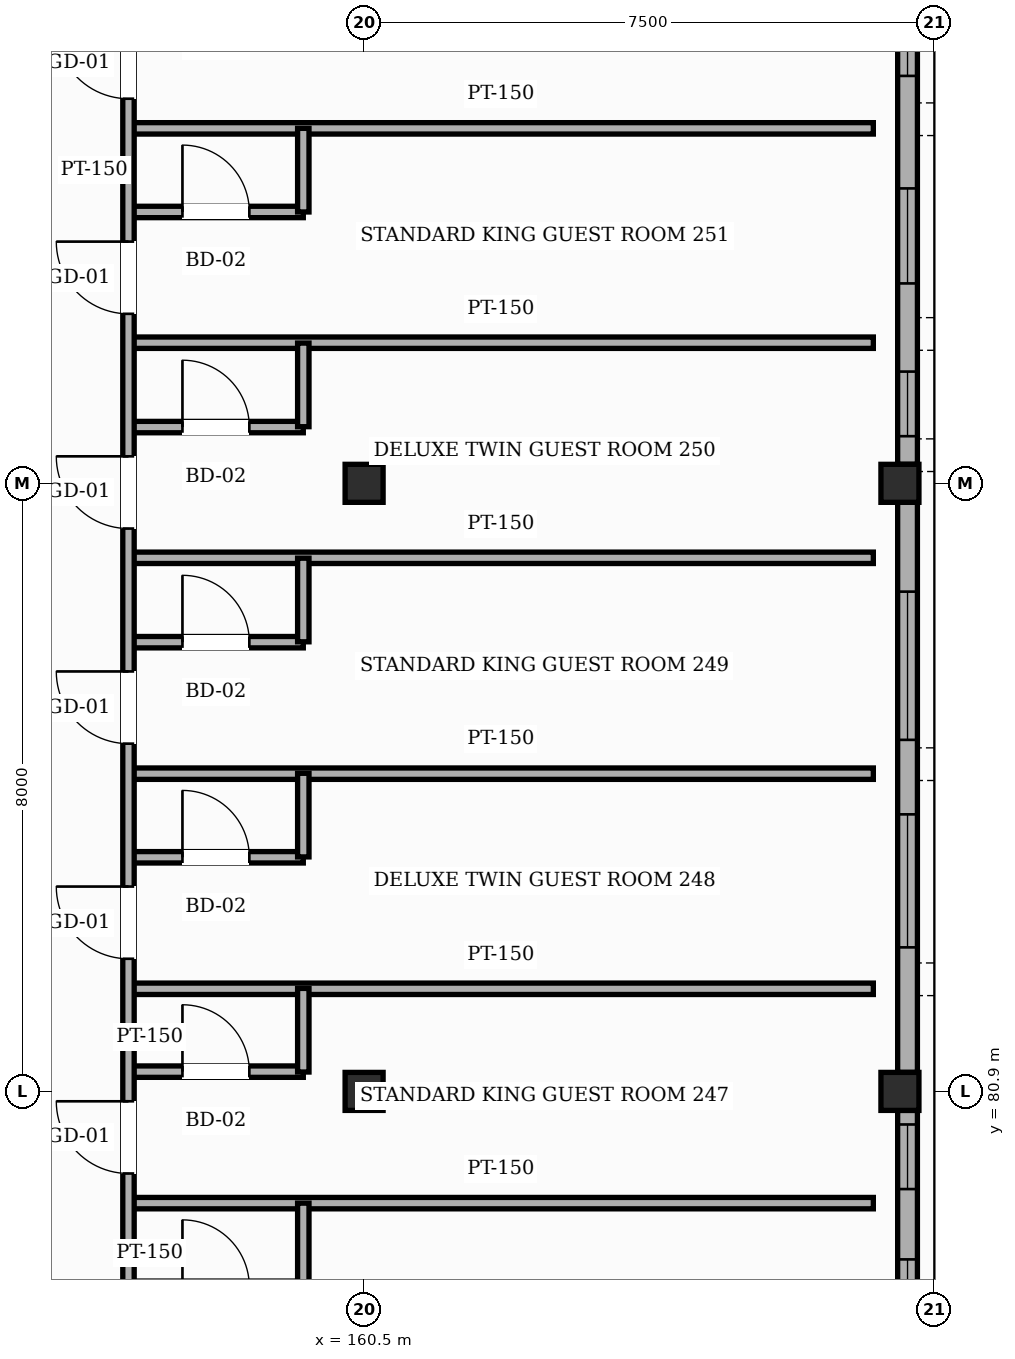
"""IFC4 building model, lengths in metres.
Left out: names, types, materials, properties, quantities, classifications, styles, units other than length and angle.
Written with IfcOpenShell. Run it as: python <this file> out.ifc"""

import sys

from ifc_helpers import new_model, si_unit, direction, frame, frame_2d, origin, origin_2d, place, context, subcontext, project, spatial, rectangle, hollow_rectangle, extrude, element, fill, save


model = new_model("IFC4")
c1 = context("Model", 3, precision=1e-05, world=origin(), true_north=direction((0.0, 1.0)))
c2 = subcontext(c1, "Body", "Model", "MODEL_VIEW")
j1 = project(units=[si_unit("LENGTHUNIT", "METRE"), si_unit("PLANEANGLEUNIT", "RADIAN")], contexts=[c1])
p1 = place(None, origin())
s1 = spatial("IfcSite", under=j1, at=p1, CompositionType="ELEMENT")
p2 = place(p1, origin())
s2 = spatial("IfcBuilding", under=s1, at=p2, CompositionType="ELEMENT")
p3 = place(p2, frame((0.0, 0.0, 35.4)))
s3 = spatial("IfcBuildingStorey", under=s2, at=p3, CompositionType="ELEMENT", Elevation=35.4)
for number, where, z_axis, x_axis in (
    (1, (160.5, 80.9, 0.0), (0.0, 0.0, 1.0), (1.0, 0.0, 0.0)),
    (2, (160.5, 88.9, 0.0), (0.0, 0.0, 1.0), (1.0, 0.0, 0.0)),
    (3, (167.55, 80.9, 0.0), (0.0, 0.0, 1.0), (1.0, 0.0, 0.0)),
    (4, (167.55, 88.9, 0.0), (0.0, 0.0, 1.0), (1.0, 0.0, 0.0)),
):
    element("IfcColumn", number, at=place(p3, frame(where, z_axis=z_axis, x_axis=x_axis)), inside=s3, PredefinedType="COLUMN", context=c2, shape_type="SweptSolid", body=[
        extrude(hollow_rectangle(XDim=0.5, YDim=0.5, WallThickness=0.022, InnerFilletRadius=0.022, OuterFilletRadius=0.044, at=origin_2d()), origin(), (0.0, 0.0, 1.0), 3.6),
    ])
p4 = place(p3, frame((167.65, 80.65, 0.0), z_axis=(0.0, 0.0, 1.0), x_axis=(0.0, -1.0, 0.0)))
e5 = element("IfcWall", 5, at=p4, inside=s3, PredefinedType="SOLIDWALL", context=c2, shape_type="SweptSolid", body=[
    extrude(rectangle(XDim=4.225, YDim=0.26, at=frame_2d((2.112, 0.0))), origin(), (0.0, 0.0, 1.0), 3.365),
])
p5 = place(p4, frame((1.96, 0.0, 0.85)))
e6 = element("IfcOpeningElement", 6, at=p5, cuts=e5, PredefinedType="OPENING", context=c2, shape_type="SweptSolid", body=[
    extrude(rectangle(XDim=1.35, YDim=1.35, at=frame_2d((0.675, 0.675))), frame((0.0, 0.14, 0.0), z_axis=(0.0, -1.0, 0.0), x_axis=(1.0, 0.0, 0.0)), (0.0, 0.0, 1.0), 0.28),
])
p6 = place(p4, frame((0.185, 0.0, 0.85)))
e7 = element("IfcOpeningElement", 7, at=p6, cuts=e5, PredefinedType="OPENING", context=c2, shape_type="SweptSolid", body=[
    extrude(rectangle(XDim=0.85, YDim=1.35, at=frame_2d((0.425, 0.675))), frame((0.0, 0.14, 0.0), z_axis=(0.0, -1.0, 0.0), x_axis=(1.0, 0.0, 0.0)), (0.0, 0.0, 1.0), 0.28),
])
p7 = place(p3, frame((167.65, 88.65, 0.0), z_axis=(0.0, 0.0, 1.0), x_axis=(0.0, -1.0, 0.0)))
e8 = element("IfcWall", 8, at=p7, inside=s3, PredefinedType="SOLIDWALL", context=c2, shape_type="SweptSolid", body=[
    extrude(rectangle(XDim=7.5, YDim=0.26, at=frame_2d((3.75, 0.0))), origin(), (0.0, 0.0, 1.0), 2.755),
])
p8 = place(p7, frame((4.105, 0.0, 0.85)))
e9 = element("IfcOpeningElement", 9, at=p8, cuts=e8, PredefinedType="OPENING", context=c2, shape_type="SweptSolid", body=[
    extrude(rectangle(XDim=1.75, YDim=1.35, at=frame_2d((0.875, 0.675))), frame((0.0, 0.14, 0.0), z_axis=(0.0, -1.0, 0.0), x_axis=(1.0, 0.0, 0.0)), (0.0, 0.0, 1.0), 0.28),
])
p9 = place(p7, frame((1.175, 0.0, 0.85)))
e10 = element("IfcOpeningElement", 10, at=p9, cuts=e8, PredefinedType="OPENING", context=c2, shape_type="SweptSolid", body=[
    extrude(rectangle(XDim=1.95, YDim=1.35, at=frame_2d((0.975, 0.675))), frame((0.0, 0.14, 0.0), z_axis=(0.0, -1.0, 0.0), x_axis=(1.0, 0.0, 0.0)), (0.0, 0.0, 1.0), 0.28),
])
p10 = place(p3, frame((167.65, 96.65, 0.0), z_axis=(0.0, 0.0, 1.0), x_axis=(0.0, -1.0, 0.0)))
e11 = element("IfcWall", 11, at=p10, inside=s3, PredefinedType="SOLIDWALL", context=c2, shape_type="SweptSolid", body=[
    extrude(rectangle(XDim=7.5, YDim=0.26, at=frame_2d((3.75, 0.0))), origin(), (0.0, 0.0, 1.0), 2.755),
])
p11 = place(p10, frame((6.28, 0.0, 0.85)))
e12 = element("IfcOpeningElement", 12, at=p11, cuts=e11, PredefinedType="OPENING", context=c2, shape_type="SweptSolid", body=[
    extrude(rectangle(XDim=0.85, YDim=1.35, at=frame_2d((0.425, 0.675))), frame((0.0, 0.14, 0.0), z_axis=(0.0, -1.0, 0.0), x_axis=(1.0, 0.0, 0.0)), (0.0, 0.0, 1.0), 0.28),
])
p12 = place(p10, frame((3.87, 0.0, 0.85)))
e13 = element("IfcOpeningElement", 13, at=p12, cuts=e11, PredefinedType="OPENING", context=c2, shape_type="SweptSolid", body=[
    extrude(rectangle(XDim=1.25, YDim=1.5, at=frame_2d((0.625, 0.75))), frame((0.0, 0.14, 0.0), z_axis=(0.0, -1.0, 0.0), x_axis=(1.0, 0.0, 0.0)), (0.0, 0.0, 1.0), 0.28),
])
p13 = place(p10, frame((0.94, 0.0, 0.85)))
e14 = element("IfcOpeningElement", 14, at=p13, cuts=e11, PredefinedType="OPENING", context=c2, shape_type="SweptSolid", body=[
    extrude(rectangle(XDim=1.45, YDim=1.5, at=frame_2d((0.725, 0.75))), frame((0.0, 0.14, 0.0), z_axis=(0.0, -1.0, 0.0), x_axis=(1.0, 0.0, 0.0)), (0.0, 0.0, 1.0), 0.28),
])
p14 = place(p3, frame((157.4, 79.43, 0.0), z_axis=(0.0, 0.0, 1.0), x_axis=(1.0, 0.0, 0.0)))
e15 = element("IfcWall", 15, at=p14, inside=s3, PredefinedType="PARTITIONING", context=c2, shape_type="SweptSolid", body=[
    extrude(rectangle(XDim=9.8, YDim=0.15, at=frame_2d((4.9, 0.0))), origin(), (0.0, 0.0, 1.0), 3.365),
])
p15 = place(p3, frame((157.4, 81.16, 0.0), z_axis=(0.0, 0.0, 1.0), x_axis=(1.0, 0.0, 0.0)))
e16 = element("IfcWall", 16, at=p15, inside=s3, PredefinedType="PARTITIONING", context=c2, shape_type="SweptSolid", body=[
    extrude(rectangle(XDim=2.3, YDim=0.15, at=frame_2d((1.15, 0.0))), origin(), (0.0, 0.0, 1.0), 2.755),
])
p16 = place(p15, frame((0.71, 0.0, 0.0)))
e17 = element("IfcOpeningElement", 17, at=p16, cuts=e16, PredefinedType="OPENING", context=c2, shape_type="SweptSolid", body=[
    extrude(rectangle(XDim=0.88, YDim=2.12, at=frame_2d((0.44, 1.06))), frame((0.0, 0.085, 0.0), z_axis=(0.0, -1.0, 0.0), x_axis=(1.0, 0.0, 0.0)), (0.0, 0.0, 1.0), 0.17),
])
p17 = place(p3, frame((157.4, 82.25, 0.0), z_axis=(0.0, 0.0, 1.0), x_axis=(1.0, 0.0, 0.0)))
e18 = element("IfcWall", 18, at=p17, inside=s3, PredefinedType="PARTITIONING", context=c2, shape_type="SweptSolid", body=[
    extrude(rectangle(XDim=9.8, YDim=0.15, at=frame_2d((4.9, 0.0))), origin(), (0.0, 0.0, 1.0), 3.365),
])
p18 = place(p3, frame((157.4, 83.98, 0.0), z_axis=(0.0, 0.0, 1.0), x_axis=(1.0, 0.0, 0.0)))
e19 = element("IfcWall", 19, at=p18, inside=s3, PredefinedType="PARTITIONING", context=c2, shape_type="SweptSolid", body=[
    extrude(rectangle(XDim=2.3, YDim=0.15, at=frame_2d((1.15, 0.0))), origin(), (0.0, 0.0, 1.0), 3.365),
])
p19 = place(p18, frame((0.71, 0.0, 0.0)))
e20 = element("IfcOpeningElement", 20, at=p19, cuts=e19, PredefinedType="OPENING", context=c2, shape_type="SweptSolid", body=[
    extrude(rectangle(XDim=0.88, YDim=2.12, at=frame_2d((0.44, 1.06))), frame((0.0, 0.085, 0.0), z_axis=(0.0, -1.0, 0.0), x_axis=(1.0, 0.0, 0.0)), (0.0, 0.0, 1.0), 0.17),
])
p20 = place(p3, frame((157.4, 85.08, 0.0), z_axis=(0.0, 0.0, 1.0), x_axis=(1.0, 0.0, 0.0)))
e21 = element("IfcWall", 21, at=p20, inside=s3, PredefinedType="PARTITIONING", context=c2, shape_type="SweptSolid", body=[
    extrude(rectangle(XDim=9.8, YDim=0.15, at=frame_2d((4.9, 0.0))), origin(), (0.0, 0.0, 1.0), 3.005),
])
p21 = place(p3, frame((157.4, 86.81, 0.0), z_axis=(0.0, 0.0, 1.0), x_axis=(1.0, 0.0, 0.0)))
e22 = element("IfcWall", 22, at=p21, inside=s3, PredefinedType="PARTITIONING", context=c2, shape_type="SweptSolid", body=[
    extrude(rectangle(XDim=2.3, YDim=0.15, at=frame_2d((1.15, 0.0))), origin(), (0.0, 0.0, 1.0), 3.365),
])
p22 = place(p21, frame((0.71, 0.0, 0.0)))
e23 = element("IfcOpeningElement", 23, at=p22, cuts=e22, PredefinedType="OPENING", context=c2, shape_type="SweptSolid", body=[
    extrude(rectangle(XDim=0.88, YDim=2.12, at=frame_2d((0.44, 1.06))), frame((0.0, 0.085, 0.0), z_axis=(0.0, -1.0, 0.0), x_axis=(1.0, 0.0, 0.0)), (0.0, 0.0, 1.0), 0.17),
])
p23 = place(p3, frame((157.4, 87.92, 0.0), z_axis=(0.0, 0.0, 1.0), x_axis=(1.0, 0.0, 0.0)))
e24 = element("IfcWall", 24, at=p23, inside=s3, PredefinedType="PARTITIONING", context=c2, shape_type="SweptSolid", body=[
    extrude(rectangle(XDim=9.8, YDim=0.15, at=frame_2d((4.9, 0.0))), origin(), (0.0, 0.0, 1.0), 3.365),
])
p24 = place(p3, frame((157.4, 89.64, 0.0), z_axis=(0.0, 0.0, 1.0), x_axis=(1.0, 0.0, 0.0)))
e25 = element("IfcWall", 25, at=p24, inside=s3, PredefinedType="PARTITIONING", context=c2, shape_type="SweptSolid", body=[
    extrude(rectangle(XDim=2.3, YDim=0.15, at=frame_2d((1.15, 0.0))), origin(), (0.0, 0.0, 1.0), 3.365),
])
p25 = place(p24, frame((0.71, 0.0, 0.0)))
e26 = element("IfcOpeningElement", 26, at=p25, cuts=e25, PredefinedType="OPENING", context=c2, shape_type="SweptSolid", body=[
    extrude(rectangle(XDim=0.88, YDim=2.12, at=frame_2d((0.44, 1.06))), frame((0.0, 0.085, 0.0), z_axis=(0.0, -1.0, 0.0), x_axis=(1.0, 0.0, 0.0)), (0.0, 0.0, 1.0), 0.17),
])
p26 = place(p3, frame((157.4, 90.75, 0.0), z_axis=(0.0, 0.0, 1.0), x_axis=(1.0, 0.0, 0.0)))
e27 = element("IfcWall", 27, at=p26, inside=s3, PredefinedType="PARTITIONING", context=c2, shape_type="SweptSolid", body=[
    extrude(rectangle(XDim=9.8, YDim=0.15, at=frame_2d((4.9, 0.0))), origin(), (0.0, 0.0, 1.0), 3.365),
])
p27 = place(p3, frame((157.4, 92.47, 0.0), z_axis=(0.0, 0.0, 1.0), x_axis=(1.0, 0.0, 0.0)))
e28 = element("IfcWall", 28, at=p27, inside=s3, PredefinedType="PARTITIONING", context=c2, shape_type="SweptSolid", body=[
    extrude(rectangle(XDim=2.3, YDim=0.15, at=frame_2d((1.15, 0.0))), origin(), (0.0, 0.0, 1.0), 3.365),
])
p28 = place(p27, frame((0.71, 0.0, 0.0)))
e29 = element("IfcOpeningElement", 29, at=p28, cuts=e28, PredefinedType="OPENING", context=c2, shape_type="SweptSolid", body=[
    extrude(rectangle(XDim=0.88, YDim=2.12, at=frame_2d((0.44, 1.06))), frame((0.0, 0.085, 0.0), z_axis=(0.0, -1.0, 0.0), x_axis=(1.0, 0.0, 0.0)), (0.0, 0.0, 1.0), 0.17),
])
p29 = place(p3, frame((157.4, 93.57, 0.0), z_axis=(0.0, 0.0, 1.0), x_axis=(1.0, 0.0, 0.0)))
e30 = element("IfcWall", 30, at=p29, inside=s3, PredefinedType="PARTITIONING", context=c2, shape_type="SweptSolid", body=[
    extrude(rectangle(XDim=9.8, YDim=0.15, at=frame_2d((4.9, 0.0))), origin(), (0.0, 0.0, 1.0), 3.365),
])
p30 = place(p3, frame((157.4, 76.6, 0.0), z_axis=(0.0, 0.0, 1.0), x_axis=(0.0, 1.0, 0.0)))
e31 = element("IfcWall", 31, at=p30, inside=s3, PredefinedType="PARTITIONING", context=c2, shape_type="SweptSolid", body=[
    extrude(rectangle(XDim=19.8, YDim=0.15, at=frame_2d((9.9, 0.0))), origin(), (0.0, 0.0, 1.0), 3.365),
])
p31 = place(p30, frame((0.315, 0.0, 0.0)))
e32 = element("IfcOpeningElement", 32, at=p31, cuts=e31, PredefinedType="OPENING", context=c2, shape_type="SweptSolid", body=[
    extrude(rectangle(XDim=1.1, YDim=2.2, at=frame_2d((0.55, 1.1))), frame((0.0, 0.085, 0.0), z_axis=(0.0, -1.0, 0.0), x_axis=(1.0, 0.0, 0.0)), (0.0, 0.0, 1.0), 0.17),
])
p32 = place(p30, frame((3.22, 0.0, 0.0)))
e33 = element("IfcOpeningElement", 33, at=p32, cuts=e31, PredefinedType="OPENING", context=c2, shape_type="SweptSolid", body=[
    extrude(rectangle(XDim=0.95, YDim=2.15, at=frame_2d((0.475, 1.075))), frame((0.0, 0.085, 0.0), z_axis=(0.0, -1.0, 0.0), x_axis=(1.0, 0.0, 0.0)), (0.0, 0.0, 1.0), 0.17),
])
p33 = place(p30, frame((6.045, 0.0, 0.0)))
e34 = element("IfcOpeningElement", 34, at=p33, cuts=e31, PredefinedType="OPENING", context=c2, shape_type="SweptSolid", body=[
    extrude(rectangle(XDim=0.95, YDim=2.15, at=frame_2d((0.475, 1.075))), frame((0.0, 0.085, 0.0), z_axis=(0.0, -1.0, 0.0), x_axis=(1.0, 0.0, 0.0)), (0.0, 0.0, 1.0), 0.17),
])
p34 = place(p30, frame((8.875, 0.0, 0.0)))
e35 = element("IfcOpeningElement", 35, at=p34, cuts=e31, PredefinedType="OPENING", context=c2, shape_type="SweptSolid", body=[
    extrude(rectangle(XDim=0.95, YDim=2.15, at=frame_2d((0.475, 1.075))), frame((0.0, 0.085, 0.0), z_axis=(0.0, -1.0, 0.0), x_axis=(1.0, 0.0, 0.0)), (0.0, 0.0, 1.0), 0.17),
])
p35 = place(p30, frame((11.705, 0.0, 0.0)))
e36 = element("IfcOpeningElement", 36, at=p35, cuts=e31, PredefinedType="OPENING", context=c2, shape_type="SweptSolid", body=[
    extrude(rectangle(XDim=0.95, YDim=2.15, at=frame_2d((0.475, 1.075))), frame((0.0, 0.085, 0.0), z_axis=(0.0, -1.0, 0.0), x_axis=(1.0, 0.0, 0.0)), (0.0, 0.0, 1.0), 0.17),
])
p36 = place(p30, frame((14.53, 0.0, 0.0)))
e37 = element("IfcOpeningElement", 37, at=p36, cuts=e31, PredefinedType="OPENING", context=c2, shape_type="SweptSolid", body=[
    extrude(rectangle(XDim=0.95, YDim=2.15, at=frame_2d((0.475, 1.075))), frame((0.0, 0.085, 0.0), z_axis=(0.0, -1.0, 0.0), x_axis=(1.0, 0.0, 0.0)), (0.0, 0.0, 1.0), 0.17),
])
p37 = place(p30, frame((17.36, 0.0, 0.0)))
e38 = element("IfcOpeningElement", 38, at=p37, cuts=e31, PredefinedType="OPENING", context=c2, shape_type="SweptSolid", body=[
    extrude(rectangle(XDim=0.95, YDim=2.15, at=frame_2d((0.475, 1.075))), frame((0.0, 0.085, 0.0), z_axis=(0.0, -1.0, 0.0), x_axis=(1.0, 0.0, 0.0)), (0.0, 0.0, 1.0), 0.17),
])
for number, where, z_axis, x_axis in (
    (39, (159.7, 78.33, 0.0), (0.0, 0.0, 1.0), (0.0, 1.0, 0.0)),
    (40, (159.7, 81.155, 0.0), (0.0, 0.0, 1.0), (0.0, 1.0, 0.0)),
    (41, (159.7, 83.985, 0.0), (0.0, 0.0, 1.0), (0.0, 1.0, 0.0)),
):
    element("IfcWall", number, at=place(p3, frame(where, z_axis=z_axis, x_axis=x_axis)), inside=s3, PredefinedType="PARTITIONING", context=c2, shape_type="SweptSolid", body=[
        extrude(rectangle(XDim=1.1, YDim=0.15, at=frame_2d((0.55, 0.0))), origin(), (0.0, 0.0, 1.0), 3.365),
    ])
for number, where, z_axis, x_axis in (
    (42, (159.7, 86.815, 0.0), (0.0, 0.0, 1.0), (0.0, 1.0, 0.0)),
    (43, (159.7, 89.645, 0.0), (0.0, 0.0, 1.0), (0.0, 1.0, 0.0)),
    (44, (159.7, 92.47, 0.0), (0.0, 0.0, 1.0), (0.0, 1.0, 0.0)),
):
    element("IfcWall", number, at=place(p3, frame(where, z_axis=z_axis, x_axis=x_axis)), inside=s3, PredefinedType="PARTITIONING", context=c2, shape_type="SweptSolid", body=[
        extrude(rectangle(XDim=1.1, YDim=0.15, at=frame_2d((0.55, 0.0))), origin(), (0.0, 0.0, 1.0), 3.365),
    ])
p38 = place(p5, origin())
e45 = element("IfcWindow", 45, at=p38, inside=s3, PartitioningType="SINGLE_PANEL", PredefinedType="WINDOW", context=c2, shape_type="SweptSolid", body=[
    extrude(rectangle(XDim=1.35, YDim=1.35, at=frame_2d((0.675, 0.675))), frame((0.0, 0.03, 0.0), z_axis=(0.0, -1.0, 0.0), x_axis=(1.0, 0.0, 0.0)), (0.0, 0.0, 1.0), 0.06),
])
fill(e6, e45)
p39 = place(p6, origin())
e46 = element("IfcWindow", 46, at=p39, inside=s3, PartitioningType="SINGLE_PANEL", PredefinedType="WINDOW", context=c2, shape_type="SweptSolid", body=[
    extrude(rectangle(XDim=0.85, YDim=1.35, at=frame_2d((0.425, 0.675))), frame((0.0, 0.03, 0.0), z_axis=(0.0, -1.0, 0.0), x_axis=(1.0, 0.0, 0.0)), (0.0, 0.0, 1.0), 0.06),
])
fill(e7, e46)
p40 = place(p8, origin())
e47 = element("IfcWindow", 47, at=p40, inside=s3, PartitioningType="SINGLE_PANEL", PredefinedType="WINDOW", context=c2, shape_type="SweptSolid", body=[
    extrude(rectangle(XDim=1.75, YDim=1.35, at=frame_2d((0.875, 0.675))), frame((0.0, 0.03, 0.0), z_axis=(0.0, -1.0, 0.0), x_axis=(1.0, 0.0, 0.0)), (0.0, 0.0, 1.0), 0.06),
])
fill(e9, e47)
p41 = place(p9, origin())
e48 = element("IfcWindow", 48, at=p41, inside=s3, PartitioningType="SINGLE_PANEL", PredefinedType="WINDOW", context=c2, shape_type="SweptSolid", body=[
    extrude(rectangle(XDim=1.95, YDim=1.35, at=frame_2d((0.975, 0.675))), frame((0.0, 0.03, 0.0), z_axis=(0.0, -1.0, 0.0), x_axis=(1.0, 0.0, 0.0)), (0.0, 0.0, 1.0), 0.06),
])
fill(e10, e48)
p42 = place(p11, origin())
e49 = element("IfcWindow", 49, at=p42, inside=s3, PartitioningType="SINGLE_PANEL", PredefinedType="WINDOW", context=c2, shape_type="SweptSolid", body=[
    extrude(rectangle(XDim=0.85, YDim=1.35, at=frame_2d((0.425, 0.675))), frame((0.0, 0.03, 0.0), z_axis=(0.0, -1.0, 0.0), x_axis=(1.0, 0.0, 0.0)), (0.0, 0.0, 1.0), 0.06),
])
fill(e12, e49)
p43 = place(p12, origin())
e50 = element("IfcWindow", 50, at=p43, inside=s3, PartitioningType="SINGLE_PANEL", PredefinedType="WINDOW", context=c2, shape_type="SweptSolid", body=[
    extrude(rectangle(XDim=1.25, YDim=1.5, at=frame_2d((0.625, 0.75))), frame((0.0, 0.03, 0.0), z_axis=(0.0, -1.0, 0.0), x_axis=(1.0, 0.0, 0.0)), (0.0, 0.0, 1.0), 0.06),
])
fill(e13, e50)
p44 = place(p13, origin())
e51 = element("IfcWindow", 51, at=p44, inside=s3, PartitioningType="SINGLE_PANEL", PredefinedType="WINDOW", context=c2, shape_type="SweptSolid", body=[
    extrude(rectangle(XDim=1.45, YDim=1.5, at=frame_2d((0.725, 0.75))), frame((0.0, 0.03, 0.0), z_axis=(0.0, -1.0, 0.0), x_axis=(1.0, 0.0, 0.0)), (0.0, 0.0, 1.0), 0.06),
])
fill(e14, e51)
p45 = place(p32, origin())
e52 = element("IfcDoor", 52, at=p45, inside=s3, OperationType="SINGLE_SWING_RIGHT", PredefinedType="DOOR", context=c2, shape_type="SweptSolid", body=[
    extrude(rectangle(XDim=0.95, YDim=2.15, at=frame_2d((0.475, 1.075))), frame((0.0, 0.025, 0.0), z_axis=(0.0, -1.0, 0.0), x_axis=(1.0, 0.0, 0.0)), (0.0, 0.0, 1.0), 0.05),
])
fill(e33, e52)
p46 = place(p16, origin())
e53 = element("IfcDoor", 53, at=p46, inside=s3, OperationType="SINGLE_SWING_LEFT", PredefinedType="DOOR", context=c2, shape_type="SweptSolid", body=[
    extrude(rectangle(XDim=0.88, YDim=2.12, at=frame_2d((0.44, 1.06))), frame((0.0, 0.025, 0.0), z_axis=(0.0, -1.0, 0.0), x_axis=(1.0, 0.0, 0.0)), (0.0, 0.0, 1.0), 0.05),
])
fill(e17, e53)
p47 = place(p33, origin())
e54 = element("IfcDoor", 54, at=p47, inside=s3, OperationType="SINGLE_SWING_RIGHT", PredefinedType="DOOR", context=c2, shape_type="SweptSolid", body=[
    extrude(rectangle(XDim=0.95, YDim=2.15, at=frame_2d((0.475, 1.075))), frame((0.0, 0.025, 0.0), z_axis=(0.0, -1.0, 0.0), x_axis=(1.0, 0.0, 0.0)), (0.0, 0.0, 1.0), 0.05),
])
fill(e34, e54)
p48 = place(p19, origin())
e55 = element("IfcDoor", 55, at=p48, inside=s3, OperationType="SINGLE_SWING_LEFT", PredefinedType="DOOR", context=c2, shape_type="SweptSolid", body=[
    extrude(rectangle(XDim=0.88, YDim=2.12, at=frame_2d((0.44, 1.06))), frame((0.0, 0.025, 0.0), z_axis=(0.0, -1.0, 0.0), x_axis=(1.0, 0.0, 0.0)), (0.0, 0.0, 1.0), 0.05),
])
fill(e20, e55)
p49 = place(p34, origin())
e56 = element("IfcDoor", 56, at=p49, inside=s3, OperationType="SINGLE_SWING_RIGHT", PredefinedType="DOOR", context=c2, shape_type="SweptSolid", body=[
    extrude(rectangle(XDim=0.95, YDim=2.15, at=frame_2d((0.475, 1.075))), frame((0.0, 0.025, 0.0), z_axis=(0.0, -1.0, 0.0), x_axis=(1.0, 0.0, 0.0)), (0.0, 0.0, 1.0), 0.05),
])
fill(e35, e56)
p50 = place(p22, origin())
e57 = element("IfcDoor", 57, at=p50, inside=s3, OperationType="SINGLE_SWING_LEFT", PredefinedType="DOOR", context=c2, shape_type="SweptSolid", body=[
    extrude(rectangle(XDim=0.88, YDim=2.12, at=frame_2d((0.44, 1.06))), frame((0.0, 0.025, 0.0), z_axis=(0.0, -1.0, 0.0), x_axis=(1.0, 0.0, 0.0)), (0.0, 0.0, 1.0), 0.05),
])
fill(e23, e57)
p51 = place(p35, origin())
e58 = element("IfcDoor", 58, at=p51, inside=s3, OperationType="SINGLE_SWING_RIGHT", PredefinedType="DOOR", context=c2, shape_type="SweptSolid", body=[
    extrude(rectangle(XDim=0.95, YDim=2.15, at=frame_2d((0.475, 1.075))), frame((0.0, 0.025, 0.0), z_axis=(0.0, -1.0, 0.0), x_axis=(1.0, 0.0, 0.0)), (0.0, 0.0, 1.0), 0.05),
])
fill(e36, e58)
p52 = place(p25, origin())
e59 = element("IfcDoor", 59, at=p52, inside=s3, OperationType="SINGLE_SWING_LEFT", PredefinedType="DOOR", context=c2, shape_type="SweptSolid", body=[
    extrude(rectangle(XDim=0.88, YDim=2.12, at=frame_2d((0.44, 1.06))), frame((0.0, 0.025, 0.0), z_axis=(0.0, -1.0, 0.0), x_axis=(1.0, 0.0, 0.0)), (0.0, 0.0, 1.0), 0.05),
])
fill(e26, e59)
p53 = place(p36, origin())
e60 = element("IfcDoor", 60, at=p53, inside=s3, OperationType="SINGLE_SWING_RIGHT", PredefinedType="DOOR", context=c2, shape_type="SweptSolid", body=[
    extrude(rectangle(XDim=0.95, YDim=2.15, at=frame_2d((0.475, 1.075))), frame((0.0, 0.025, 0.0), z_axis=(0.0, -1.0, 0.0), x_axis=(1.0, 0.0, 0.0)), (0.0, 0.0, 1.0), 0.05),
])
fill(e37, e60)
p54 = place(p28, origin())
e61 = element("IfcDoor", 61, at=p54, inside=s3, OperationType="SINGLE_SWING_LEFT", PredefinedType="DOOR", context=c2, shape_type="SweptSolid", body=[
    extrude(rectangle(XDim=0.88, YDim=2.12, at=frame_2d((0.44, 1.06))), frame((0.0, 0.025, 0.0), z_axis=(0.0, -1.0, 0.0), x_axis=(1.0, 0.0, 0.0)), (0.0, 0.0, 1.0), 0.05),
])
fill(e29, e61)
p55 = place(p37, origin())
e62 = element("IfcDoor", 62, at=p55, inside=s3, OperationType="SINGLE_SWING_RIGHT", PredefinedType="DOOR", context=c2, shape_type="SweptSolid", body=[
    extrude(rectangle(XDim=0.95, YDim=2.15, at=frame_2d((0.475, 1.075))), frame((0.0, 0.025, 0.0), z_axis=(0.0, -1.0, 0.0), x_axis=(1.0, 0.0, 0.0)), (0.0, 0.0, 1.0), 0.05),
])
fill(e38, e62)
save(model, sys.argv[1])
